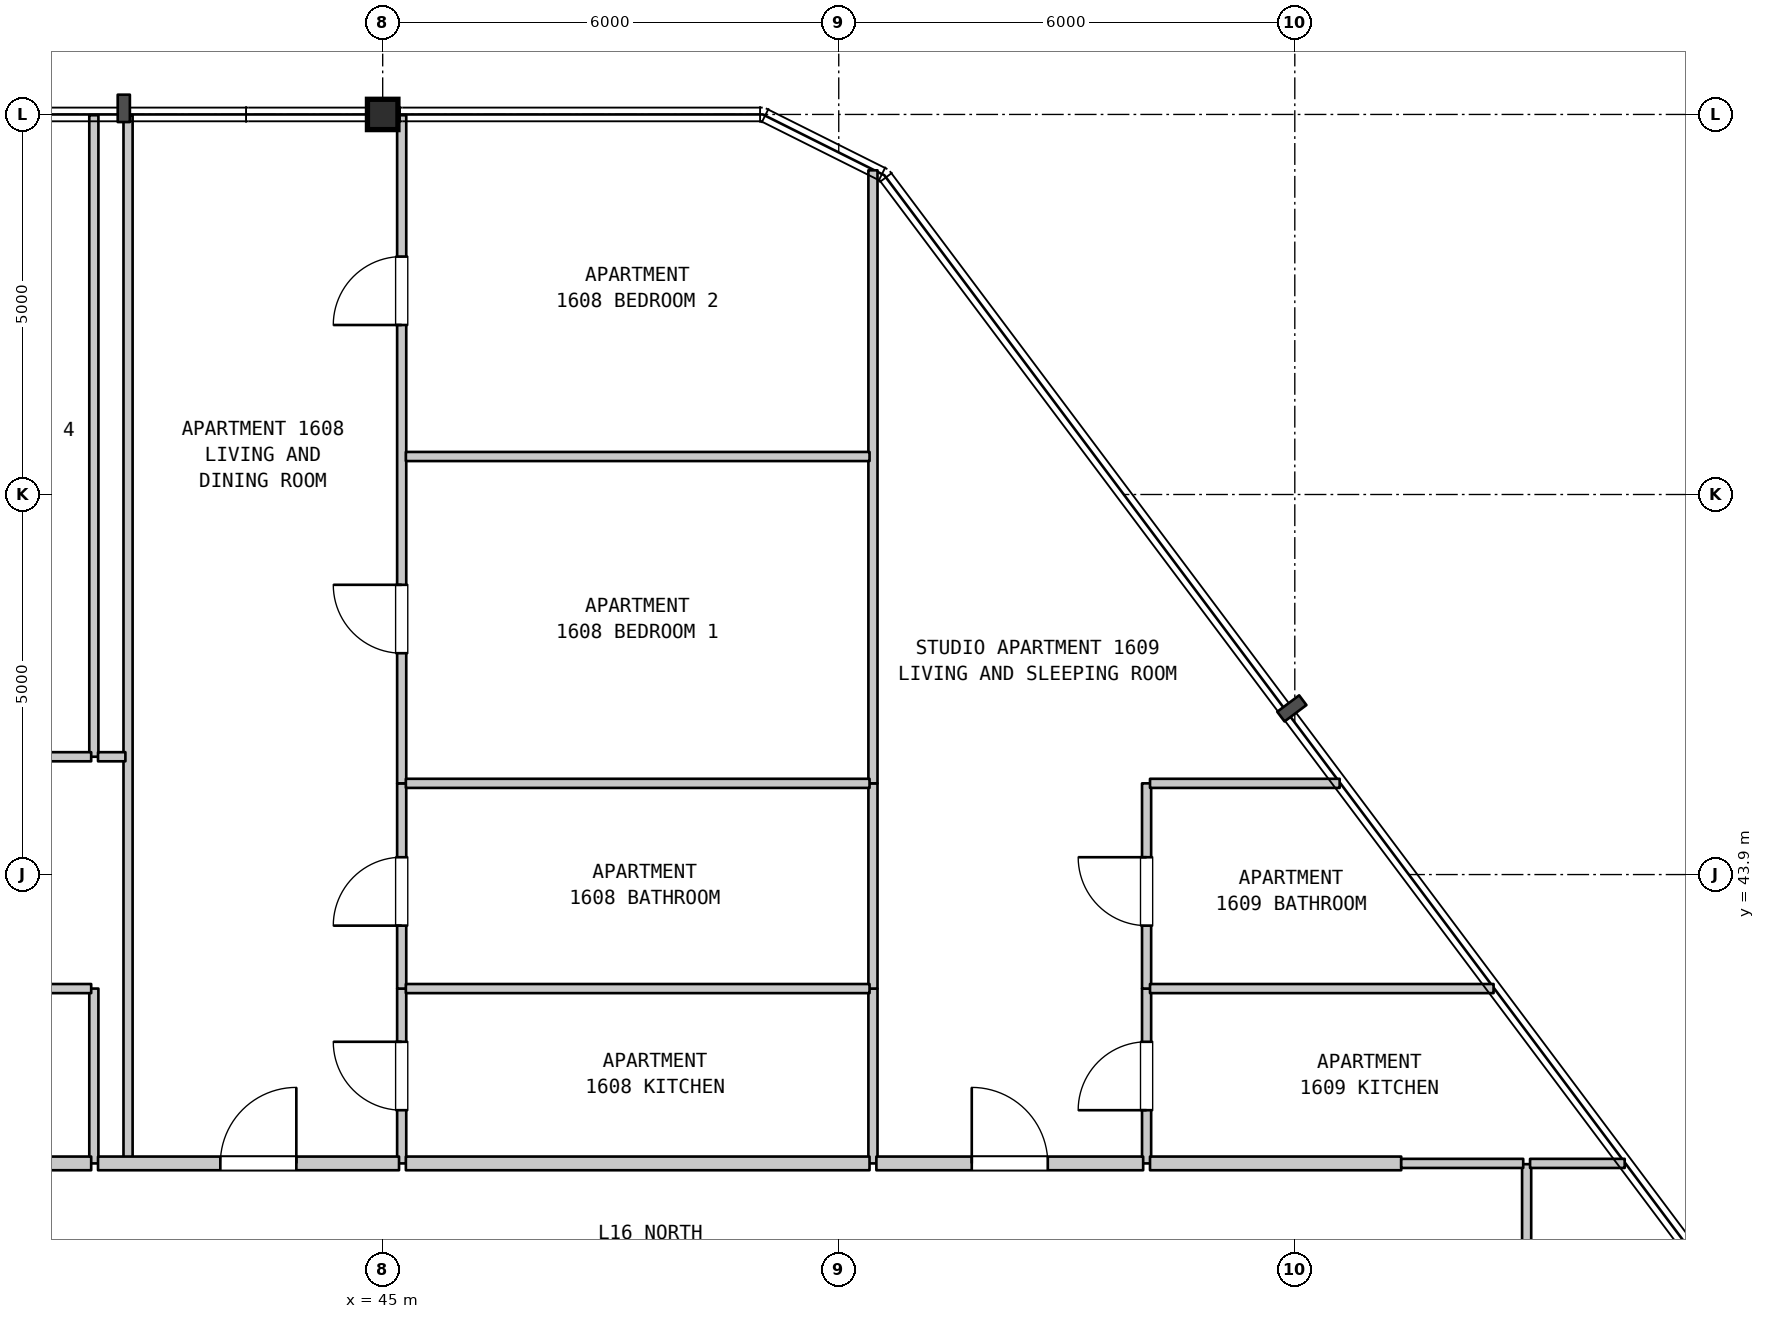
"""IFC4 building model, lengths in metres.
Left out: names, types, materials, properties, quantities, classifications, styles, units other than length and angle.
Written with IfcOpenShell. Run it as: python <this file> out.ifc"""

import sys

from ifc_helpers import new_model, si_unit, direction, frame, frame_2d, origin, origin_2d, place, context, subcontext, project, spatial, rectangle, i_section, extrude, element, fill, save


model = new_model("IFC4")
c1 = context("Model", 3, precision=1e-05, world=origin(), true_north=direction((0.0, 1.0)))
c2 = subcontext(c1, "Body", "Model", "MODEL_VIEW")
j1 = project(units=[si_unit("LENGTHUNIT", "METRE"), si_unit("PLANEANGLEUNIT", "RADIAN")], contexts=[c1])
p1 = place(None, origin())
s1 = spatial("IfcSite", under=j1, at=p1, CompositionType="ELEMENT")
p2 = place(p1, origin())
s2 = spatial("IfcBuilding", under=s1, at=p2, CompositionType="ELEMENT")
p3 = place(p2, frame((0.0, 0.0, 70.1)))
s3 = spatial("IfcBuildingStorey", under=s2, at=p3, CompositionType="ELEMENT", Elevation=70.1)
p4 = place(p3, frame((45.0, 53.9, 0.0), z_axis=(0.0, 0.0, 1.0), x_axis=(1.0, 0.0, 0.0)))
e1 = element("IfcColumn", 1, at=p4, inside=s3, PredefinedType="COLUMN", context=c2, shape_type="SweptSolid", body=[
    extrude(i_section(OverallWidth=0.401, OverallDepth=0.399, WebThickness=0.025, FlangeThickness=0.04, FilletRadius=0.015, at=origin_2d()), origin(), (0.0, 0.0, 1.0), 3.7),
])
p5 = place(p3, frame((41.2, 40.1, 0.0), z_axis=(0.0, 0.0, 1.0), x_axis=(0.0, 1.0, 0.0)))
e2 = element("IfcWall", 2, at=p5, inside=s3, PredefinedType="PARTITIONING", context=c2, shape_type="SweptSolid", body=[
    extrude(rectangle(XDim=2.3, YDim=0.12, at=frame_2d((1.15, 0.0))), origin(), (0.0, 0.0, 1.0), 3.385),
])
p6 = place(p3, frame((41.2, 45.45, 0.0), z_axis=(0.0, 0.0, 1.0), x_axis=(0.0, 1.0, 0.0)))
e3 = element("IfcWall", 3, at=p6, inside=s3, PredefinedType="PARTITIONING", context=c2, shape_type="SweptSolid", body=[
    extrude(rectangle(XDim=8.44, YDim=0.12, at=frame_2d((4.22, 0.0))), origin(), (0.0, 0.0, 1.0), 3.385),
])
p7 = place(p3, frame((41.65, 40.1, 0.0), z_axis=(0.0, 0.0, 1.0), x_axis=(0.0, 1.0, 0.0)))
e4 = element("IfcWall", 4, at=p7, inside=s3, PredefinedType="PARTITIONING", context=c2, shape_type="SweptSolid", body=[
    extrude(rectangle(XDim=13.79, YDim=0.12, at=frame_2d((6.895, 0.0))), origin(), (0.0, 0.0, 1.0), 3.385),
])
p8 = place(p3, frame((45.25, 40.1, 0.0), z_axis=(0.0, 0.0, 1.0), x_axis=(0.0, 1.0, 0.0)))
e5 = element("IfcWall", 5, at=p8, inside=s3, PredefinedType="PARTITIONING", context=c2, shape_type="SweptSolid", body=[
    extrude(rectangle(XDim=2.3, YDim=0.12, at=frame_2d((1.15, 0.0))), origin(), (0.0, 0.0, 1.0), 3.385),
])
p9 = place(p8, frame((0.7, 0.0, 0.0)))
e6 = element("IfcOpeningElement", 6, at=p9, cuts=e5, PredefinedType="OPENING", context=c2, shape_type="SweptSolid", body=[
    extrude(rectangle(XDim=0.9, YDim=2.15, at=frame_2d((0.45, 1.075))), frame((0.0, 0.07, 0.0), z_axis=(0.0, -1.0, 0.0), x_axis=(1.0, 0.0, 0.0)), (0.0, 0.0, 1.0), 0.14),
])
p10 = place(p3, frame((45.25, 42.4, 0.0), z_axis=(0.0, 0.0, 1.0), x_axis=(0.0, 1.0, 0.0)))
e7 = element("IfcWall", 7, at=p10, inside=s3, PredefinedType="PARTITIONING", context=c2, shape_type="SweptSolid", body=[
    extrude(rectangle(XDim=2.7, YDim=0.12, at=frame_2d((1.35, 0.0))), origin(), (0.0, 0.0, 1.0), 3.385),
])
p11 = place(p10, frame((0.828, 0.0, 0.0)))
e8 = element("IfcOpeningElement", 8, at=p11, cuts=e7, PredefinedType="OPENING", context=c2, shape_type="SweptSolid", body=[
    extrude(rectangle(XDim=0.9, YDim=2.1, at=frame_2d((0.45, 1.05))), frame((0.0, 0.07, 0.0), z_axis=(0.0, -1.0, 0.0), x_axis=(1.0, 0.0, 0.0)), (0.0, 0.0, 1.0), 0.14),
])
p12 = place(p3, frame((45.25, 45.1, 0.0), z_axis=(0.0, 0.0, 1.0), x_axis=(0.0, 1.0, 0.0)))
e9 = element("IfcWall", 9, at=p12, inside=s3, PredefinedType="PARTITIONING", context=c2, shape_type="SweptSolid", body=[
    extrude(rectangle(XDim=8.79, YDim=0.12, at=frame_2d((4.395, 0.0))), origin(), (0.0, 0.0, 1.0), 3.385),
])
p13 = place(p12, frame((1.712, 0.0, 0.0)))
e10 = element("IfcOpeningElement", 10, at=p13, cuts=e9, PredefinedType="OPENING", context=c2, shape_type="SweptSolid", body=[
    extrude(rectangle(XDim=0.9, YDim=2.15, at=frame_2d((0.45, 1.075))), frame((0.0, 0.07, 0.0), z_axis=(0.0, -1.0, 0.0), x_axis=(1.0, 0.0, 0.0)), (0.0, 0.0, 1.0), 0.14),
])
p14 = place(p12, frame((6.03, 0.0, 0.0)))
e11 = element("IfcOpeningElement", 11, at=p14, cuts=e9, PredefinedType="OPENING", context=c2, shape_type="SweptSolid", body=[
    extrude(rectangle(XDim=0.9, YDim=2.15, at=frame_2d((0.45, 1.075))), frame((0.0, 0.07, 0.0), z_axis=(0.0, -1.0, 0.0), x_axis=(1.0, 0.0, 0.0)), (0.0, 0.0, 1.0), 0.14),
])
p15 = place(p3, frame((51.45, 40.1, 0.0), z_axis=(0.0, 0.0, 1.0), x_axis=(0.0, 1.0, 0.0)))
e12 = element("IfcWall", 12, at=p15, inside=s3, PredefinedType="PARTITIONING", context=c2, shape_type="SweptSolid", body=[
    extrude(rectangle(XDim=2.3, YDim=0.12, at=frame_2d((1.15, 0.0))), origin(), (0.0, 0.0, 1.0), 3.385),
])
p16 = place(p3, frame((51.45, 42.4, 0.0), z_axis=(0.0, 0.0, 1.0), x_axis=(0.0, 1.0, 0.0)))
e13 = element("IfcWall", 13, at=p16, inside=s3, PredefinedType="PARTITIONING", context=c2, shape_type="SweptSolid", body=[
    extrude(rectangle(XDim=2.7, YDim=0.12, at=frame_2d((1.35, 0.0))), origin(), (0.0, 0.0, 1.0), 3.385),
])
p17 = place(p3, frame((51.45, 45.1, 0.0), z_axis=(0.0, 0.0, 1.0), x_axis=(0.0, 1.0, 0.0)))
e14 = element("IfcWall", 14, at=p17, inside=s3, PredefinedType="PARTITIONING", context=c2, shape_type="SweptSolid", body=[
    extrude(rectangle(XDim=8.065, YDim=0.12, at=frame_2d((4.032, 0.0))), origin(), (0.0, 0.0, 1.0), 3.385),
])
p18 = place(p3, frame((55.05, 40.1, 0.0), z_axis=(0.0, 0.0, 1.0), x_axis=(0.0, 1.0, 0.0)))
e15 = element("IfcWall", 15, at=p18, inside=s3, PredefinedType="PARTITIONING", context=c2, shape_type="SweptSolid", body=[
    extrude(rectangle(XDim=2.3, YDim=0.12, at=frame_2d((1.15, 0.0))), origin(), (0.0, 0.0, 1.0), 3.385),
])
p19 = place(p18, frame((0.7, 0.0, 0.0)))
e16 = element("IfcOpeningElement", 16, at=p19, cuts=e15, PredefinedType="OPENING", context=c2, shape_type="SweptSolid", body=[
    extrude(rectangle(XDim=0.9, YDim=2.15, at=frame_2d((0.45, 1.075))), frame((0.0, 0.07, 0.0), z_axis=(0.0, -1.0, 0.0), x_axis=(1.0, 0.0, 0.0)), (0.0, 0.0, 1.0), 0.14),
])
p20 = place(p3, frame((55.05, 42.4, 0.0), z_axis=(0.0, 0.0, 1.0), x_axis=(0.0, 1.0, 0.0)))
e17 = element("IfcWall", 17, at=p20, inside=s3, PredefinedType="PARTITIONING", context=c2, shape_type="SweptSolid", body=[
    extrude(rectangle(XDim=2.7, YDim=0.12, at=frame_2d((1.35, 0.0))), origin(), (0.0, 0.0, 1.0), 3.385),
])
p21 = place(p20, frame((0.828, 0.0, 0.0)))
e18 = element("IfcOpeningElement", 18, at=p21, cuts=e17, PredefinedType="OPENING", context=c2, shape_type="SweptSolid", body=[
    extrude(rectangle(XDim=0.9, YDim=2.1, at=frame_2d((0.45, 1.05))), frame((0.0, 0.07, 0.0), z_axis=(0.0, -1.0, 0.0), x_axis=(1.0, 0.0, 0.0)), (0.0, 0.0, 1.0), 0.14),
])
p22 = place(p3, frame((60.05, 37.89, 0.0), z_axis=(0.0, 0.0, 1.0), x_axis=(0.0, 1.0, 0.0)))
e19 = element("IfcWall", 19, at=p22, inside=s3, PredefinedType="PARTITIONING", context=c2, shape_type="SweptSolid", body=[
    extrude(rectangle(XDim=2.2, YDim=0.12, at=frame_2d((1.1, 0.0))), origin(), (0.0, 0.0, 1.0), 3.385),
])
p23 = place(p3, frame((37.25, 40.1, 0.0), z_axis=(0.0, 0.0, 1.0), x_axis=(1.0, 0.0, 0.0)))
e20 = element("IfcWall", 20, at=p23, inside=s3, PredefinedType="STANDARD", context=c2, shape_type="SweptSolid", body=[
    extrude(rectangle(XDim=3.915, YDim=0.18, at=frame_2d((1.958, 0.0))), origin(), (0.0, 0.0, 1.0), 3.385),
])
p24 = place(p3, frame((41.255, 40.1, 0.0), z_axis=(0.0, 0.0, 1.0), x_axis=(1.0, 0.0, 0.0)))
e21 = element("IfcWall", 21, at=p24, inside=s3, PredefinedType="STANDARD", context=c2, shape_type="SweptSolid", body=[
    extrude(rectangle(XDim=3.96, YDim=0.18, at=frame_2d((1.98, 0.0))), origin(), (0.0, 0.0, 1.0), 3.385),
])
p25 = place(p24, frame((1.609, 0.0, 0.0)))
e22 = element("IfcOpeningElement", 22, at=p25, cuts=e21, PredefinedType="OPENING", context=c2, shape_type="SweptSolid", body=[
    extrude(rectangle(XDim=1.0, YDim=2.15, at=frame_2d((0.5, 1.075))), frame((0.0, 0.1, 0.0), z_axis=(0.0, -1.0, 0.0), x_axis=(1.0, 0.0, 0.0)), (0.0, 0.0, 1.0), 0.2),
])
p26 = place(p3, frame((45.305, 40.1, 0.0), z_axis=(0.0, 0.0, 1.0), x_axis=(1.0, 0.0, 0.0)))
e23 = element("IfcWall", 23, at=p26, inside=s3, PredefinedType="STANDARD", context=c2, shape_type="SweptSolid", body=[
    extrude(rectangle(XDim=6.1, YDim=0.18, at=frame_2d((3.05, 0.0))), origin(), (0.0, 0.0, 1.0), 3.385),
])
p27 = place(p3, frame((51.495, 40.1, 0.0), z_axis=(0.0, 0.0, 1.0), x_axis=(1.0, 0.0, 0.0)))
e24 = element("IfcWall", 24, at=p27, inside=s3, PredefinedType="STANDARD", context=c2, shape_type="SweptSolid", body=[
    extrude(rectangle(XDim=3.51, YDim=0.18, at=frame_2d((1.755, 0.0))), origin(), (0.0, 0.0, 1.0), 3.385),
])
p28 = place(p27, frame((1.255, 0.0, 0.0)))
e25 = element("IfcOpeningElement", 25, at=p28, cuts=e24, PredefinedType="OPENING", context=c2, shape_type="SweptSolid", body=[
    extrude(rectangle(XDim=1.0, YDim=2.15, at=frame_2d((0.5, 1.075))), frame((0.0, 0.1, 0.0), z_axis=(0.0, -1.0, 0.0), x_axis=(1.0, 0.0, 0.0)), (0.0, 0.0, 1.0), 0.2),
])
p29 = place(p3, frame((55.095, 40.1, 0.0), z_axis=(0.0, 0.0, 1.0), x_axis=(1.0, 0.0, 0.0)))
e26 = element("IfcWall", 26, at=p29, inside=s3, PredefinedType="STANDARD", context=c2, shape_type="SweptSolid", body=[
    extrude(rectangle(XDim=3.305, YDim=0.18, at=frame_2d((1.652, 0.0))), origin(), (0.0, 0.0, 1.0), 3.385),
])
p30 = place(p3, frame((58.4, 40.1, 0.0), z_axis=(0.0, 0.0, 1.0), x_axis=(1.0, 0.0, 0.0)))
e27 = element("IfcWall", 27, at=p30, inside=s3, PredefinedType="PARTITIONING", context=c2, shape_type="SweptSolid", body=[
    extrude(rectangle(XDim=1.605, YDim=0.12, at=frame_2d((0.802, 0.0))), origin(), (0.0, 0.0, 1.0), 3.385),
])
p31 = place(p3, frame((60.095, 40.1, 0.0), z_axis=(0.0, 0.0, 1.0), x_axis=(1.0, 0.0, 0.0)))
e28 = element("IfcWall", 28, at=p31, inside=s3, PredefinedType="PARTITIONING", context=c2, shape_type="SweptSolid", body=[
    extrude(rectangle(XDim=1.245, YDim=0.12, at=frame_2d((0.623, 0.0))), origin(), (0.0, 0.0, 1.0), 3.385),
])
p32 = place(p3, frame((37.25, 42.4, 0.0), z_axis=(0.0, 0.0, 1.0), x_axis=(1.0, 0.0, 0.0)))
e29 = element("IfcWall", 29, at=p32, inside=s3, PredefinedType="PARTITIONING", context=c2, shape_type="SweptSolid", body=[
    extrude(rectangle(XDim=3.915, YDim=0.12, at=frame_2d((1.958, 0.0))), origin(), (0.0, 0.0, 1.0), 3.385),
])
p33 = place(p32, frame((1.508, 0.0, 0.0)))
e30 = element("IfcOpeningElement", 30, at=p33, cuts=e29, PredefinedType="OPENING", context=c2, shape_type="SweptSolid", body=[
    extrude(rectangle(XDim=0.9, YDim=2.15, at=frame_2d((0.45, 1.075))), frame((0.0, 0.07, 0.0), z_axis=(0.0, -1.0, 0.0), x_axis=(1.0, 0.0, 0.0)), (0.0, 0.0, 1.0), 0.14),
])
p34 = place(p3, frame((45.305, 42.4, 0.0), z_axis=(0.0, 0.0, 1.0), x_axis=(1.0, 0.0, 0.0)))
e31 = element("IfcWall", 31, at=p34, inside=s3, PredefinedType="PARTITIONING", context=c2, shape_type="SweptSolid", body=[
    extrude(rectangle(XDim=6.1, YDim=0.12, at=frame_2d((3.05, 0.0))), origin(), (0.0, 0.0, 1.0), 3.385),
])
p35 = place(p3, frame((55.095, 42.4, 0.0), z_axis=(0.0, 0.0, 1.0), x_axis=(1.0, 0.0, 0.0)))
e32 = element("IfcWall", 32, at=p35, inside=s3, PredefinedType="PARTITIONING", context=c2, shape_type="SweptSolid", body=[
    extrude(rectangle(XDim=4.52, YDim=0.12, at=frame_2d((2.26, 0.0))), origin(), (0.0, 0.0, 1.0), 3.385),
])
p36 = place(p3, frame((45.305, 45.1, 0.0), z_axis=(0.0, 0.0, 1.0), x_axis=(1.0, 0.0, 0.0)))
e33 = element("IfcWall", 33, at=p36, inside=s3, PredefinedType="PARTITIONING", context=c2, shape_type="SweptSolid", body=[
    extrude(rectangle(XDim=6.1, YDim=0.12, at=frame_2d((3.05, 0.0))), origin(), (0.0, 0.0, 1.0), 3.385),
])
p37 = place(p3, frame((55.095, 45.1, 0.0), z_axis=(0.0, 0.0, 1.0), x_axis=(1.0, 0.0, 0.0)))
e34 = element("IfcWall", 34, at=p37, inside=s3, PredefinedType="PARTITIONING", context=c2, shape_type="SweptSolid", body=[
    extrude(rectangle(XDim=2.495, YDim=0.12, at=frame_2d((1.248, 0.0))), origin(), (0.0, 0.0, 1.0), 3.385),
])
p38 = place(p3, frame((30.545, 45.45, 0.0), z_axis=(0.0, 0.0, 1.0), x_axis=(1.0, 0.0, 0.0)))
e35 = element("IfcWall", 35, at=p38, inside=s3, PredefinedType="PARTITIONING", context=c2, shape_type="SweptSolid", body=[
    extrude(rectangle(XDim=10.62, YDim=0.12, at=frame_2d((5.31, 0.0))), origin(), (0.0, 0.0, 1.0), 3.385),
])
p39 = place(p38, frame((1.019, 0.0, 0.0)))
e36 = element("IfcOpeningElement", 36, at=p39, cuts=e35, PredefinedType="OPENING", context=c2, shape_type="SweptSolid", body=[
    extrude(rectangle(XDim=0.9, YDim=2.15, at=frame_2d((0.45, 1.075))), frame((0.0, 0.07, 0.0), z_axis=(0.0, -1.0, 0.0), x_axis=(1.0, 0.0, 0.0)), (0.0, 0.0, 1.0), 0.14),
])
p40 = place(p38, frame((3.45, 0.0, 0.0)))
e37 = element("IfcOpeningElement", 37, at=p40, cuts=e35, PredefinedType="OPENING", context=c2, shape_type="SweptSolid", body=[
    extrude(rectangle(XDim=0.9, YDim=2.15, at=frame_2d((0.45, 1.075))), frame((0.0, 0.07, 0.0), z_axis=(0.0, -1.0, 0.0), x_axis=(1.0, 0.0, 0.0)), (0.0, 0.0, 1.0), 0.14),
])
p41 = place(p38, frame((6.127, 0.0, 0.0)))
e38 = element("IfcOpeningElement", 38, at=p41, cuts=e35, PredefinedType="OPENING", context=c2, shape_type="SweptSolid", body=[
    extrude(rectangle(XDim=0.9, YDim=2.15, at=frame_2d((0.45, 1.075))), frame((0.0, 0.07, 0.0), z_axis=(0.0, -1.0, 0.0), x_axis=(1.0, 0.0, 0.0)), (0.0, 0.0, 1.0), 0.14),
])
p42 = place(p38, frame((8.701, 0.0, 0.0)))
e39 = element("IfcOpeningElement", 39, at=p42, cuts=e35, PredefinedType="OPENING", context=c2, shape_type="SweptSolid", body=[
    extrude(rectangle(XDim=0.9, YDim=2.15, at=frame_2d((0.45, 1.075))), frame((0.0, 0.07, 0.0), z_axis=(0.0, -1.0, 0.0), x_axis=(1.0, 0.0, 0.0)), (0.0, 0.0, 1.0), 0.14),
])
p43 = place(p3, frame((41.255, 45.45, 0.0), z_axis=(0.0, 0.0, 1.0), x_axis=(1.0, 0.0, 0.0)))
e40 = element("IfcWall", 40, at=p43, inside=s3, PredefinedType="PARTITIONING", context=c2, shape_type="SweptSolid", body=[
    extrude(rectangle(XDim=0.36, YDim=0.12, at=frame_2d((0.18, 0.0))), origin(), (0.0, 0.0, 1.0), 3.385),
])
p44 = place(p3, frame((45.305, 49.4, 0.0), z_axis=(0.0, 0.0, 1.0), x_axis=(1.0, 0.0, 0.0)))
e41 = element("IfcWall", 41, at=p44, inside=s3, PredefinedType="PARTITIONING", context=c2, shape_type="SweptSolid", body=[
    extrude(rectangle(XDim=6.1, YDim=0.12, at=frame_2d((3.05, 0.0))), origin(), (0.0, 0.0, 1.0), 3.385),
])
p45 = place(p9, origin())
e42 = element("IfcDoor", 42, at=p45, inside=s3, OperationType="SINGLE_SWING_RIGHT", PredefinedType="DOOR", context=c2, shape_type="SweptSolid", body=[
    extrude(rectangle(XDim=0.9, YDim=2.15, at=frame_2d((0.45, 1.075))), frame((0.0, 0.025, 0.0), z_axis=(0.0, -1.0, 0.0), x_axis=(1.0, 0.0, 0.0)), (0.0, 0.0, 1.0), 0.05),
])
fill(e6, e42)
p46 = place(p11, origin())
e43 = element("IfcDoor", 43, at=p46, inside=s3, OperationType="SINGLE_SWING_LEFT", PredefinedType="DOOR", context=c2, shape_type="SweptSolid", body=[
    extrude(rectangle(XDim=0.9, YDim=2.1, at=frame_2d((0.45, 1.05))), frame((0.0, 0.025, 0.0), z_axis=(0.0, -1.0, 0.0), x_axis=(1.0, 0.0, 0.0)), (0.0, 0.0, 1.0), 0.05),
])
fill(e8, e43)
p47 = place(p13, origin())
e44 = element("IfcDoor", 44, at=p47, inside=s3, OperationType="SINGLE_SWING_RIGHT", PredefinedType="DOOR", context=c2, shape_type="SweptSolid", body=[
    extrude(rectangle(XDim=0.9, YDim=2.15, at=frame_2d((0.45, 1.075))), frame((0.0, 0.025, 0.0), z_axis=(0.0, -1.0, 0.0), x_axis=(1.0, 0.0, 0.0)), (0.0, 0.0, 1.0), 0.05),
])
fill(e10, e44)
p48 = place(p14, origin())
e45 = element("IfcDoor", 45, at=p48, inside=s3, OperationType="SINGLE_SWING_LEFT", PredefinedType="DOOR", context=c2, shape_type="SweptSolid", body=[
    extrude(rectangle(XDim=0.9, YDim=2.15, at=frame_2d((0.45, 1.075))), frame((0.0, 0.025, 0.0), z_axis=(0.0, -1.0, 0.0), x_axis=(1.0, 0.0, 0.0)), (0.0, 0.0, 1.0), 0.05),
])
fill(e11, e45)
p49 = place(p19, origin())
e46 = element("IfcDoor", 46, at=p49, inside=s3, OperationType="SINGLE_SWING_LEFT", PredefinedType="DOOR", context=c2, shape_type="SweptSolid", body=[
    extrude(rectangle(XDim=0.9, YDim=2.15, at=frame_2d((0.45, 1.075))), frame((0.0, 0.025, 0.0), z_axis=(0.0, -1.0, 0.0), x_axis=(1.0, 0.0, 0.0)), (0.0, 0.0, 1.0), 0.05),
])
fill(e16, e46)
p50 = place(p21, origin())
e47 = element("IfcDoor", 47, at=p50, inside=s3, OperationType="SINGLE_SWING_RIGHT", PredefinedType="DOOR", context=c2, shape_type="SweptSolid", body=[
    extrude(rectangle(XDim=0.9, YDim=2.1, at=frame_2d((0.45, 1.05))), frame((0.0, 0.025, 0.0), z_axis=(0.0, -1.0, 0.0), x_axis=(1.0, 0.0, 0.0)), (0.0, 0.0, 1.0), 0.05),
])
fill(e18, e47)
p51 = place(p25, origin())
e48 = element("IfcDoor", 48, at=p51, inside=s3, OperationType="SINGLE_SWING_RIGHT", PredefinedType="DOOR", context=c2, shape_type="SweptSolid", body=[
    extrude(rectangle(XDim=1.0, YDim=2.15, at=frame_2d((0.5, 1.075))), frame((0.0, 0.025, 0.0), z_axis=(0.0, -1.0, 0.0), x_axis=(1.0, 0.0, 0.0)), (0.0, 0.0, 1.0), 0.05),
])
fill(e22, e48)
p52 = place(p28, origin())
e49 = element("IfcDoor", 49, at=p52, inside=s3, OperationType="SINGLE_SWING_LEFT", PredefinedType="DOOR", context=c2, shape_type="SweptSolid", body=[
    extrude(rectangle(XDim=1.0, YDim=2.15, at=frame_2d((0.5, 1.075))), frame((0.0, 0.025, 0.0), z_axis=(0.0, -1.0, 0.0), x_axis=(1.0, 0.0, 0.0)), (0.0, 0.0, 1.0), 0.05),
])
fill(e25, e49)
save(model, sys.argv[1])
